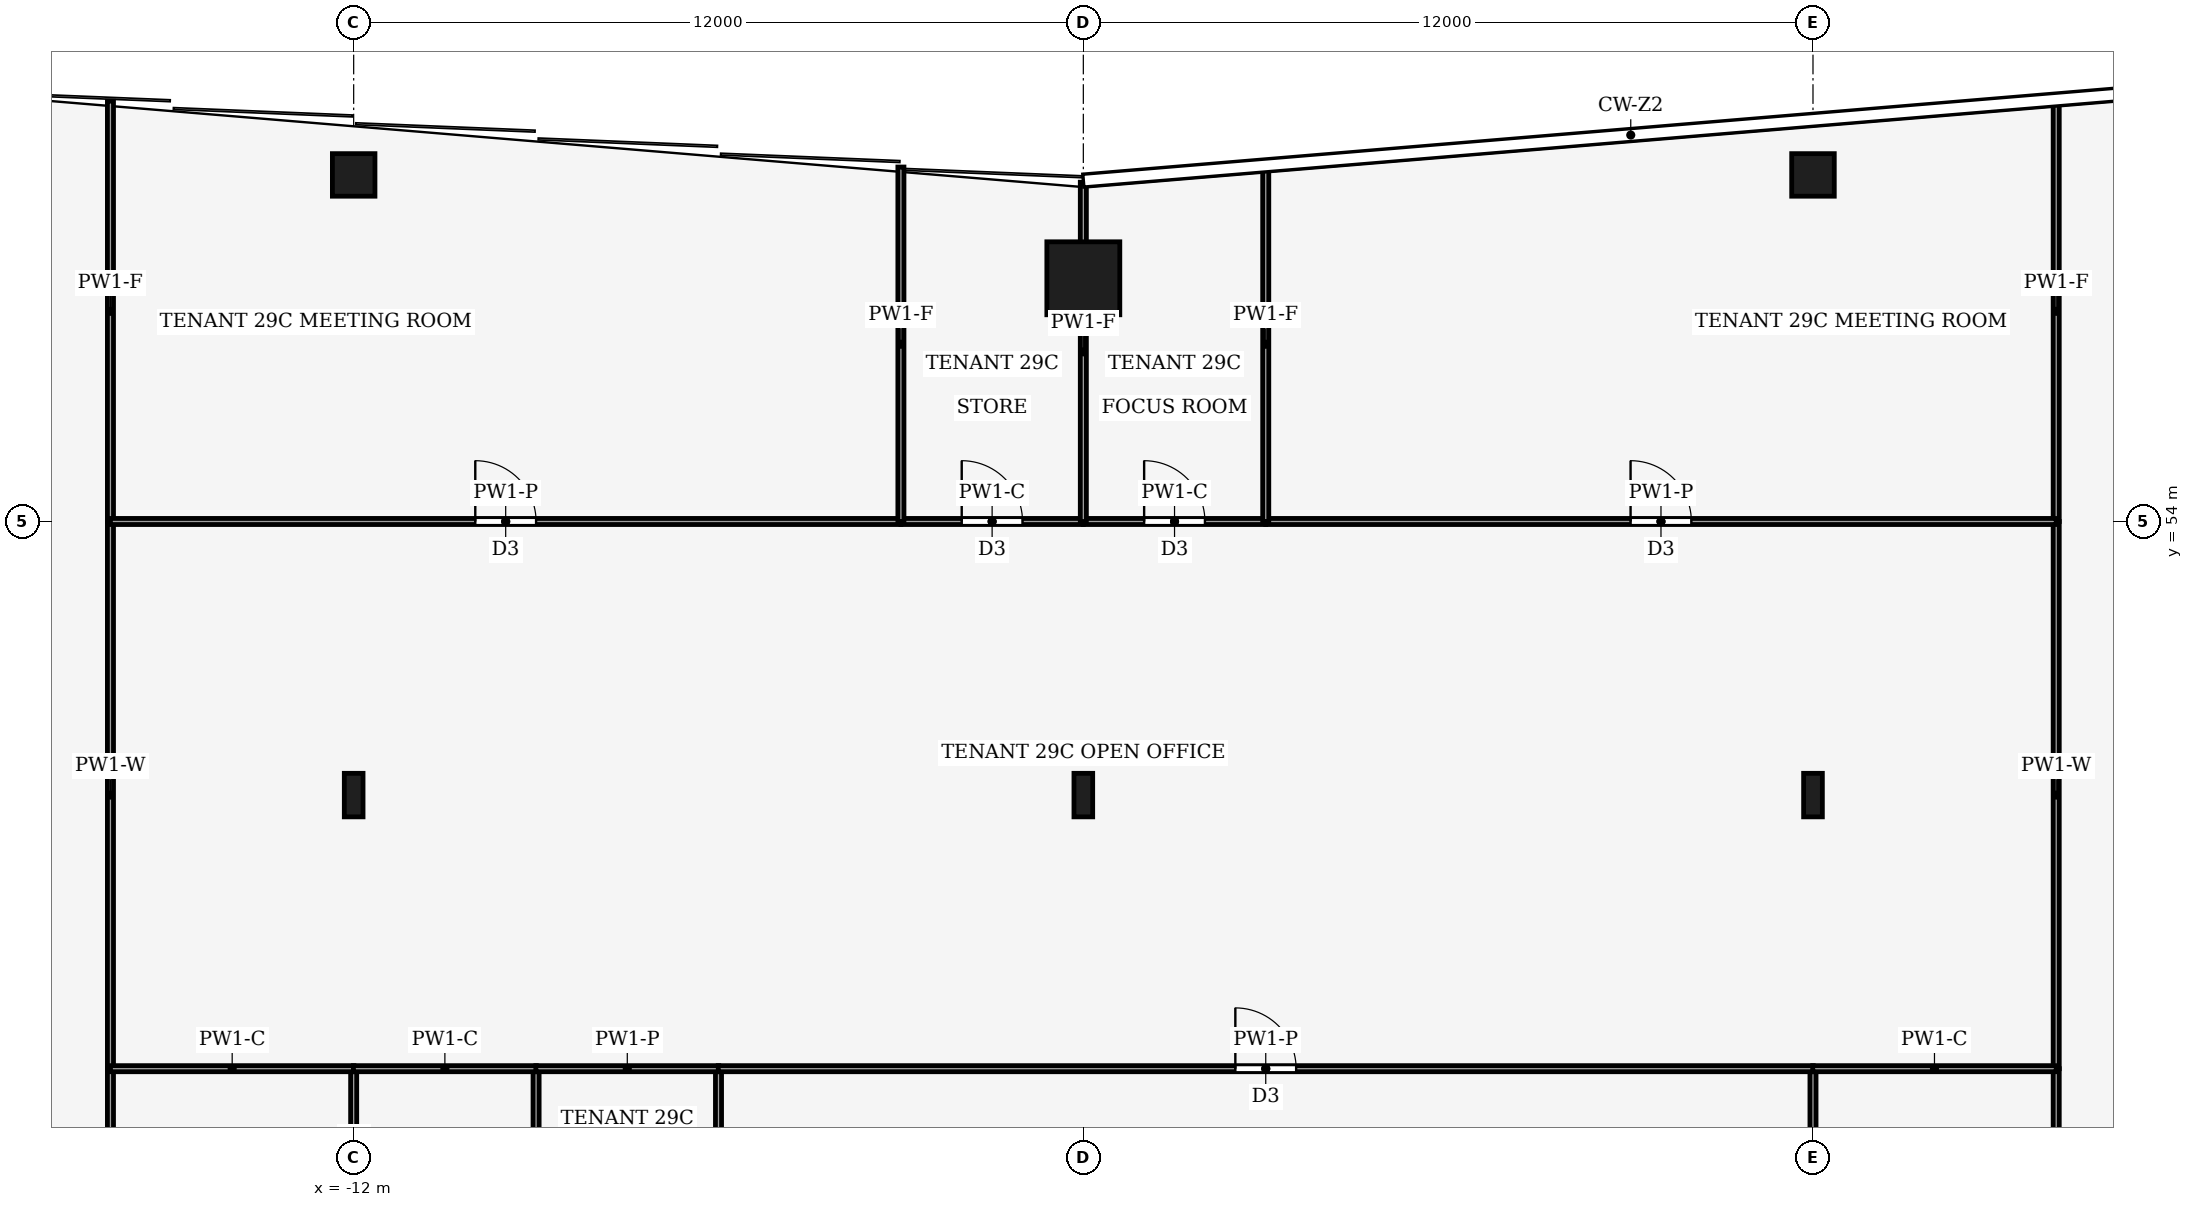
"""IFC4 building model, lengths in metres.
Left out: names, types, materials, properties, quantities, classifications, styles, units other than length and angle.
Written with IfcOpenShell. Run it as: python <this file> out.ifc"""

import sys

from ifc_helpers import new_model, si_unit, direction, frame, frame_2d, origin, origin_2d, place, context, subcontext, project, spatial, rectangle, hollow_rectangle, i_section, extrude, element, fill, save


model = new_model("IFC4")
c1 = context("Model", 3, precision=1e-05, world=origin(), true_north=direction((0.0, 1.0)))
c2 = subcontext(c1, "Body", "Model", "MODEL_VIEW")
j1 = project(units=[si_unit("LENGTHUNIT", "METRE"), si_unit("PLANEANGLEUNIT", "RADIAN")], contexts=[c1])
p1 = place(None, origin())
s1 = spatial("IfcSite", under=j1, at=p1, CompositionType="ELEMENT")
p2 = place(p1, origin())
s2 = spatial("IfcBuilding", under=s1, at=p2, CompositionType="ELEMENT")
p3 = place(p2, frame((0.0, 0.0, 130.0)))
s3 = spatial("IfcBuildingStorey", under=s2, at=p3, CompositionType="ELEMENT", Elevation=130.0)
p4 = place(p3, frame((0.0, 58.0, 0.0), z_axis=(0.0, 0.0, 1.0), x_axis=(1.0, 0.0, 0.0)))
e1 = element("IfcColumn", 1, at=p4, inside=s3, PredefinedType="COLUMN", context=c2, shape_type="SweptSolid", body=[
    extrude(hollow_rectangle(XDim=1.2, YDim=1.2, WallThickness=0.07, at=origin_2d()), origin(), (0.0, 0.0, 1.0), 4.0),
])
for number, where, z_axis, x_axis in (
    (2, (-12.0, 59.7, 0.0), (0.0, 0.0, 1.0), (1.0, 0.0, 0.0)),
    (3, (12.0, 59.7, 0.0), (0.0, 0.0, 1.0), (1.0, 0.0, 0.0)),
):
    element("IfcColumn", number, at=place(p3, frame(where, z_axis=z_axis, x_axis=x_axis)), inside=s3, PredefinedType="COLUMN", context=c2, shape_type="SweptSolid", body=[
        extrude(hollow_rectangle(XDim=0.7, YDim=0.7, WallThickness=0.03, at=origin_2d()), origin(), (0.0, 0.0, 1.0), 4.0),
    ])
for number, where, z_axis, x_axis in (
    (4, (-12.0, 49.5, 0.0), (0.0, 0.0, 1.0), (1.0, 0.0, 0.0)),
    (5, (0.0, 49.5, 0.0), (0.0, 0.0, 1.0), (1.0, 0.0, 0.0)),
    (6, (12.0, 49.5, 0.0), (0.0, 0.0, 1.0), (1.0, 0.0, 0.0)),
):
    element("IfcColumn", number, at=place(p3, frame(where, z_axis=z_axis, x_axis=x_axis)), inside=s3, PredefinedType="COLUMN", context=c2, shape_type="SweptSolid", body=[
        extrude(i_section(OverallWidth=0.308, OverallDepth=0.716, WebThickness=0.021, FlangeThickness=0.04, FilletRadius=0.027, at=origin_2d()), origin(), (0.0, 0.0, 1.0), 4.0),
    ])
p5 = place(p3, frame((-16.0, 41.0, 0.0), z_axis=(0.0, 0.0, 1.0), x_axis=(0.0, 1.0, 0.0)))
e7 = element("IfcWall", 7, at=p5, inside=s3, PredefinedType="PARTITIONING", context=c2, shape_type="SweptSolid", body=[
    extrude(rectangle(XDim=4.0, YDim=0.1, at=frame_2d((2.0, 0.0))), origin(), (0.0, 0.0, 1.0), 3.44),
])
p6 = place(p3, frame((-16.0, 45.0, 0.0), z_axis=(0.0, 0.0, 1.0), x_axis=(0.0, 1.0, 0.0)))
e8 = element("IfcWall", 8, at=p6, inside=s3, PredefinedType="PARTITIONING", context=c2, shape_type="SweptSolid", body=[
    extrude(rectangle(XDim=9.0, YDim=0.1, at=frame_2d((4.5, 0.0))), origin(), (0.0, 0.0, 1.0), 3.24),
])
p7 = place(p3, frame((-16.0, 54.0, 0.0), z_axis=(0.0, 0.0, 1.0), x_axis=(0.0, 1.0, 0.0)))
e9 = element("IfcWall", 9, at=p7, inside=s3, PredefinedType="PARTITIONING", context=c2, shape_type="SweptSolid", body=[
    extrude(rectangle(XDim=6.913, YDim=0.1, at=frame_2d((3.457, 0.0))), origin(), (0.0, 0.0, 1.0), 3.04),
])
p8 = place(p3, frame((16.0, 45.0, 0.0), z_axis=(0.0, 0.0, 1.0), x_axis=(0.0, -1.0, 0.0)))
e10 = element("IfcWall", 10, at=p8, inside=s3, PredefinedType="PARTITIONING", context=c2, shape_type="SweptSolid", body=[
    extrude(rectangle(XDim=4.0, YDim=0.1, at=frame_2d((2.0, 0.0))), origin(), (0.0, 0.0, 1.0), 3.44),
])
p9 = place(p3, frame((16.0, 54.0, 0.0), z_axis=(0.0, 0.0, 1.0), x_axis=(0.0, -1.0, 0.0)))
e11 = element("IfcWall", 11, at=p9, inside=s3, PredefinedType="PARTITIONING", context=c2, shape_type="SweptSolid", body=[
    extrude(rectangle(XDim=9.0, YDim=0.1, at=frame_2d((4.5, 0.0))), origin(), (0.0, 0.0, 1.0), 3.24),
])
p10 = place(p3, frame((16.0, 60.913, 0.0), z_axis=(0.0, 0.0, 1.0), x_axis=(0.0, -1.0, 0.0)))
e12 = element("IfcWall", 12, at=p10, inside=s3, PredefinedType="PARTITIONING", context=c2, shape_type="SweptSolid", body=[
    extrude(rectangle(XDim=6.913, YDim=0.1, at=frame_2d((3.457, 0.0))), origin(), (0.0, 0.0, 1.0), 3.04),
])
p11 = place(p3, frame((-12.0, 45.0, 0.0), z_axis=(0.0, 0.0, 1.0), x_axis=(0.0, -1.0, 0.0)))
e13 = element("IfcWall", 13, at=p11, inside=s3, PredefinedType="PARTITIONING", context=c2, shape_type="SweptSolid", body=[
    extrude(rectangle(XDim=4.0, YDim=0.1, at=frame_2d((2.0, 0.0))), origin(), (0.0, 0.0, 1.0), 3.44),
])
p12 = place(p11, frame((1.1, 0.0, 0.0)))
e14 = element("IfcOpeningElement", 14, at=p12, cuts=e13, PredefinedType="OPENING", context=c2, shape_type="SweptSolid", body=[
    extrude(rectangle(XDim=1.0, YDim=2.1, at=frame_2d((0.5, 1.05))), frame((0.0, 0.06, 0.0), z_axis=(0.0, -1.0, 0.0), x_axis=(1.0, 0.0, 0.0)), (0.0, 0.0, 1.0), 0.12),
])
p13 = place(p3, frame((-11.996, 45.0, 0.0), z_axis=(0.0, 0.0, 1.0), x_axis=(-1.0, 0.0, 0.0)))
e15 = element("IfcWall", 15, at=p13, inside=s3, PredefinedType="PARTITIONING", context=c2, shape_type="SweptSolid", body=[
    extrude(rectangle(XDim=4.004, YDim=0.1, at=frame_2d((2.002, 0.0))), origin(), (0.0, 0.0, 1.0), 3.87),
])
p14 = place(p3, frame((-9.0, 41.0, 0.0), z_axis=(0.0, 0.0, 1.0), x_axis=(0.0, 1.0, 0.0)))
e16 = element("IfcWall", 16, at=p14, inside=s3, PredefinedType="PARTITIONING", context=c2, shape_type="SweptSolid", body=[
    extrude(rectangle(XDim=4.0, YDim=0.1, at=frame_2d((2.0, 0.0))), origin(), (0.0, 0.0, 1.0), 3.87),
])
p15 = place(p3, frame((-8.996, 45.0, 0.0), z_axis=(0.0, 0.0, 1.0), x_axis=(-1.0, 0.0, 0.0)))
e17 = element("IfcWall", 17, at=p15, inside=s3, PredefinedType="PARTITIONING", context=c2, shape_type="SweptSolid", body=[
    extrude(rectangle(XDim=3.008, YDim=0.1, at=frame_2d((1.504, 0.0))), origin(), (0.0, 0.0, 1.0), 3.87),
])
p16 = place(p3, frame((-6.0, 41.0, 0.0), z_axis=(0.0, 0.0, 1.0), x_axis=(0.0, 1.0, 0.0)))
e18 = element("IfcWall", 18, at=p16, inside=s3, PredefinedType="PARTITIONING", context=c2, shape_type="SweptSolid", body=[
    extrude(rectangle(XDim=4.0, YDim=0.1, at=frame_2d((2.0, 0.0))), origin(), (0.0, 0.0, 1.0), 3.87),
])
p17 = place(p16, frame((1.5, 0.0, 0.0)))
e19 = element("IfcOpeningElement", 19, at=p17, cuts=e18, PredefinedType="OPENING", context=c2, shape_type="SweptSolid", body=[
    extrude(rectangle(XDim=1.0, YDim=2.1, at=frame_2d((0.5, 1.05))), frame((0.0, 0.06, 0.0), z_axis=(0.0, -1.0, 0.0), x_axis=(1.0, 0.0, 0.0)), (0.0, 0.0, 1.0), 0.12),
])
p18 = place(p3, frame((-5.996, 45.0, 0.0), z_axis=(0.0, 0.0, 1.0), x_axis=(-1.0, 0.0, 0.0)))
e20 = element("IfcWall", 20, at=p18, inside=s3, PredefinedType="PARTITIONING", context=c2, shape_type="SweptSolid", body=[
    extrude(rectangle(XDim=3.008, YDim=0.1, at=frame_2d((1.504, 0.0))), origin(), (0.0, 0.0, 1.0), 3.44),
])
p19 = place(p3, frame((12.0, 41.0, 0.0), z_axis=(0.0, 0.0, 1.0), x_axis=(0.0, 1.0, 0.0)))
e21 = element("IfcWall", 21, at=p19, inside=s3, PredefinedType="PARTITIONING", context=c2, shape_type="SweptSolid", body=[
    extrude(rectangle(XDim=4.0, YDim=0.1, at=frame_2d((2.0, 0.0))), origin(), (0.0, 0.0, 1.0), 3.44),
])
p20 = place(p3, frame((-6.004, 45.0, 0.0), z_axis=(0.0, 0.0, 1.0), x_axis=(1.0, 0.0, 0.0)))
e22 = element("IfcWall", 22, at=p20, inside=s3, PredefinedType="PARTITIONING", context=c2, shape_type="SweptSolid", body=[
    extrude(rectangle(XDim=18.008, YDim=0.1, at=frame_2d((9.004, 0.0))), origin(), (0.0, 0.0, 1.0), 3.44),
])
p21 = place(p20, frame((8.504, 0.0, 0.0)))
e23 = element("IfcOpeningElement", 23, at=p21, cuts=e22, PredefinedType="OPENING", context=c2, shape_type="SweptSolid", body=[
    extrude(rectangle(XDim=1.0, YDim=2.1, at=frame_2d((0.5, 1.05))), frame((0.0, 0.06, 0.0), z_axis=(0.0, -1.0, 0.0), x_axis=(1.0, 0.0, 0.0)), (0.0, 0.0, 1.0), 0.12),
])
p22 = place(p3, frame((16.0, 45.0, 0.0), z_axis=(0.0, 0.0, 1.0), x_axis=(-1.0, 0.0, 0.0)))
e24 = element("IfcWall", 24, at=p22, inside=s3, PredefinedType="PARTITIONING", context=c2, shape_type="SweptSolid", body=[
    extrude(rectangle(XDim=4.004, YDim=0.1, at=frame_2d((2.002, 0.0))), origin(), (0.0, 0.0, 1.0), 3.87),
])
p23 = place(p3, frame((-16.0, 54.0, 0.0), z_axis=(0.0, 0.0, 1.0), x_axis=(1.0, 0.0, 0.0)))
e25 = element("IfcWall", 25, at=p23, inside=s3, PredefinedType="PARTITIONING", context=c2, shape_type="SweptSolid", body=[
    extrude(rectangle(XDim=13.0, YDim=0.1, at=frame_2d((6.5, 0.0))), origin(), (0.0, 0.0, 1.0), 3.44),
])
p24 = place(p23, frame((6.0, 0.0, 0.0)))
e26 = element("IfcOpeningElement", 26, at=p24, cuts=e25, PredefinedType="OPENING", context=c2, shape_type="SweptSolid", body=[
    extrude(rectangle(XDim=1.0, YDim=2.1, at=frame_2d((0.5, 1.05))), frame((0.0, 0.06, 0.0), z_axis=(0.0, -1.0, 0.0), x_axis=(1.0, 0.0, 0.0)), (0.0, 0.0, 1.0), 0.12),
])
p25 = place(p3, frame((-3.0, 54.0, 0.0), z_axis=(0.0, 0.0, 1.0), x_axis=(1.0, 0.0, 0.0)))
e27 = element("IfcWall", 27, at=p25, inside=s3, PredefinedType="PARTITIONING", context=c2, shape_type="SweptSolid", body=[
    extrude(rectangle(XDim=3.0, YDim=0.1, at=frame_2d((1.5, 0.0))), origin(), (0.0, 0.0, 1.0), 3.87),
])
p26 = place(p25, frame((1.0, 0.0, 0.0)))
e28 = element("IfcOpeningElement", 28, at=p26, cuts=e27, PredefinedType="OPENING", context=c2, shape_type="SweptSolid", body=[
    extrude(rectangle(XDim=1.0, YDim=2.1, at=frame_2d((0.5, 1.05))), frame((0.0, 0.06, 0.0), z_axis=(0.0, -1.0, 0.0), x_axis=(1.0, 0.0, 0.0)), (0.0, 0.0, 1.0), 0.12),
])
p27 = place(p3, frame((0.0, 54.0, 0.0), z_axis=(0.0, 0.0, 1.0), x_axis=(1.0, 0.0, 0.0)))
e29 = element("IfcWall", 29, at=p27, inside=s3, PredefinedType="PARTITIONING", context=c2, shape_type="SweptSolid", body=[
    extrude(rectangle(XDim=3.0, YDim=0.1, at=frame_2d((1.5, 0.0))), origin(), (0.0, 0.0, 1.0), 3.87),
])
p28 = place(p27, frame((1.0, 0.0, 0.0)))
e30 = element("IfcOpeningElement", 30, at=p28, cuts=e29, PredefinedType="OPENING", context=c2, shape_type="SweptSolid", body=[
    extrude(rectangle(XDim=1.0, YDim=2.1, at=frame_2d((0.5, 1.05))), frame((0.0, 0.06, 0.0), z_axis=(0.0, -1.0, 0.0), x_axis=(1.0, 0.0, 0.0)), (0.0, 0.0, 1.0), 0.12),
])
p29 = place(p3, frame((3.0, 54.0, 0.0), z_axis=(0.0, 0.0, 1.0), x_axis=(1.0, 0.0, 0.0)))
e31 = element("IfcWall", 31, at=p29, inside=s3, PredefinedType="PARTITIONING", context=c2, shape_type="SweptSolid", body=[
    extrude(rectangle(XDim=13.0, YDim=0.1, at=frame_2d((6.5, 0.0))), origin(), (0.0, 0.0, 1.0), 3.44),
])
p30 = place(p29, frame((6.0, 0.0, 0.0)))
e32 = element("IfcOpeningElement", 32, at=p30, cuts=e31, PredefinedType="OPENING", context=c2, shape_type="SweptSolid", body=[
    extrude(rectangle(XDim=1.0, YDim=2.1, at=frame_2d((0.5, 1.05))), frame((0.0, 0.06, 0.0), z_axis=(0.0, -1.0, 0.0), x_axis=(1.0, 0.0, 0.0)), (0.0, 0.0, 1.0), 0.12),
])
p31 = place(p3, frame((-3.0, 54.0, 0.0), z_axis=(0.0, 0.0, 1.0), x_axis=(0.0, 1.0, 0.0)))
e33 = element("IfcWall", 33, at=p31, inside=s3, PredefinedType="PARTITIONING", context=c2, shape_type="SweptSolid", body=[
    extrude(rectangle(XDim=5.83, YDim=0.1, at=frame_2d((2.915, 0.0))), origin(), (0.0, 0.0, 1.0), 3.04),
])
p32 = place(p3, frame((0.0, 54.0, 0.0), z_axis=(0.0, 0.0, 1.0), x_axis=(0.0, 1.0, 0.0)))
e34 = element("IfcWall", 34, at=p32, inside=s3, PredefinedType="PARTITIONING", context=c2, shape_type="SweptSolid", body=[
    extrude(rectangle(XDim=5.58, YDim=0.1, at=frame_2d((2.79, 0.0))), origin(), (0.0, 0.0, 1.0), 3.04),
])
p33 = place(p3, frame((3.0, 54.0, 0.0), z_axis=(0.0, 0.0, 1.0), x_axis=(0.0, 1.0, 0.0)))
e35 = element("IfcWall", 35, at=p33, inside=s3, PredefinedType="PARTITIONING", context=c2, shape_type="SweptSolid", body=[
    extrude(rectangle(XDim=5.83, YDim=0.1, at=frame_2d((2.915, 0.0))), origin(), (0.0, 0.0, 1.0), 3.04),
])
p34 = place(p21, origin())
e36 = element("IfcDoor", 36, at=p34, inside=s3, OperationType="SINGLE_SWING_LEFT", PredefinedType="DOOR", context=c2, shape_type="SweptSolid", body=[
    extrude(rectangle(XDim=1.0, YDim=2.1, at=frame_2d((0.5, 1.05))), frame((0.0, 0.025, 0.0), z_axis=(0.0, -1.0, 0.0), x_axis=(1.0, 0.0, 0.0)), (0.0, 0.0, 1.0), 0.05),
])
fill(e23, e36)
p35 = place(p24, origin())
e37 = element("IfcDoor", 37, at=p35, inside=s3, OperationType="SINGLE_SWING_RIGHT", PredefinedType="DOOR", context=c2, shape_type="SweptSolid", body=[
    extrude(rectangle(XDim=1.0, YDim=2.1, at=frame_2d((0.5, 1.05))), frame((0.0, 0.025, 0.0), z_axis=(0.0, -1.0, 0.0), x_axis=(1.0, 0.0, 0.0)), (0.0, 0.0, 1.0), 0.05),
])
fill(e26, e37)
p36 = place(p26, origin())
e38 = element("IfcDoor", 38, at=p36, inside=s3, OperationType="SINGLE_SWING_LEFT", PredefinedType="DOOR", context=c2, shape_type="SweptSolid", body=[
    extrude(rectangle(XDim=1.0, YDim=2.1, at=frame_2d((0.5, 1.05))), frame((0.0, 0.025, 0.0), z_axis=(0.0, -1.0, 0.0), x_axis=(1.0, 0.0, 0.0)), (0.0, 0.0, 1.0), 0.05),
])
fill(e28, e38)
p37 = place(p28, origin())
e39 = element("IfcDoor", 39, at=p37, inside=s3, OperationType="SINGLE_SWING_RIGHT", PredefinedType="DOOR", context=c2, shape_type="SweptSolid", body=[
    extrude(rectangle(XDim=1.0, YDim=2.1, at=frame_2d((0.5, 1.05))), frame((0.0, 0.025, 0.0), z_axis=(0.0, -1.0, 0.0), x_axis=(1.0, 0.0, 0.0)), (0.0, 0.0, 1.0), 0.05),
])
fill(e30, e39)
p38 = place(p30, origin())
e40 = element("IfcDoor", 40, at=p38, inside=s3, OperationType="SINGLE_SWING_LEFT", PredefinedType="DOOR", context=c2, shape_type="SweptSolid", body=[
    extrude(rectangle(XDim=1.0, YDim=2.1, at=frame_2d((0.5, 1.05))), frame((0.0, 0.025, 0.0), z_axis=(0.0, -1.0, 0.0), x_axis=(1.0, 0.0, 0.0)), (0.0, 0.0, 1.0), 0.05),
])
fill(e32, e40)
save(model, sys.argv[1])
